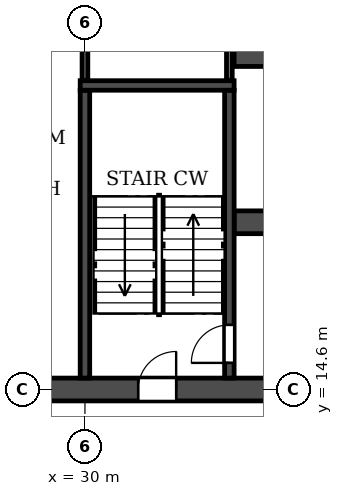
"""IFC4 building model, lengths in metres.
Left out: names, types, materials, properties, quantities, classifications, styles, units other than length and angle.
Written with IfcOpenShell. Run it as: python <this file> out.ifc"""

import sys

from ifc_helpers import new_model, si_unit, direction, frame, frame_2d, origin, place, context, subcontext, project, spatial, rectangle, extrude, element, fill, save


model = new_model("IFC4")
c1 = context("Model", 3, precision=1e-05, world=origin(), true_north=direction((0.0, 1.0)))
c2 = subcontext(c1, "Body", "Model", "MODEL_VIEW")
j1 = project(units=[si_unit("LENGTHUNIT", "METRE"), si_unit("PLANEANGLEUNIT", "RADIAN")], contexts=[c1])
p1 = place(None, origin())
s1 = spatial("IfcSite", under=j1, at=p1, CompositionType="ELEMENT")
p2 = place(p1, origin())
s2 = spatial("IfcBuilding", under=s1, at=p2, CompositionType="ELEMENT")
p3 = place(p2, frame((0.0, 0.0, 26.7)))
s3 = spatial("IfcBuildingStorey", under=s2, at=p3, CompositionType="ELEMENT", Elevation=26.7)
p4 = place(p3, frame((2.6, 14.6, 0.0), z_axis=(0.0, 0.0, 1.0), x_axis=(1.0, 0.0, 0.0)))
e1 = element("IfcWall", 1, at=p4, inside=s3, PredefinedType="SOLIDWALL", context=c2, shape_type="SweptSolid", body=[
    extrude(rectangle(XDim=96.8, YDim=0.6, at=frame_2d((48.4, 0.0))), origin(), (0.0, 0.0, 1.0), 3.05),
])
p5 = place(p4, frame((7.2, 0.0, 0.0)))
e2 = element("IfcOpeningElement", 2, at=p5, cuts=e1, PredefinedType="OPENING", context=c2, shape_type="SweptSolid", body=[
    extrude(rectangle(XDim=1.0, YDim=2.1, at=frame_2d((0.5, 1.05))), frame((0.0, 0.31, 0.0), z_axis=(0.0, -1.0, 0.0), x_axis=(1.0, 0.0, 0.0)), (0.0, 0.0, 1.0), 0.62),
])
p6 = place(p4, frame((16.3, 0.0, 0.0)))
e3 = element("IfcOpeningElement", 3, at=p6, cuts=e1, PredefinedType="OPENING", context=c2, shape_type="SweptSolid", body=[
    extrude(rectangle(XDim=1.0, YDim=2.1, at=frame_2d((0.5, 1.05))), frame((0.0, 0.31, 0.0), z_axis=(0.0, -1.0, 0.0), x_axis=(1.0, 0.0, 0.0)), (0.0, 0.0, 1.0), 0.62),
])
p7 = place(p4, frame((24.2, 0.0, 0.0)))
e4 = element("IfcOpeningElement", 4, at=p7, cuts=e1, PredefinedType="OPENING", context=c2, shape_type="SweptSolid", body=[
    extrude(rectangle(XDim=1.0, YDim=2.1, at=frame_2d((0.5, 1.05))), frame((0.0, 0.31, 0.0), z_axis=(0.0, -1.0, 0.0), x_axis=(1.0, 0.0, 0.0)), (0.0, 0.0, 1.0), 0.62),
])
p8 = place(p4, frame((28.8, 0.0, 0.0)))
e5 = element("IfcOpeningElement", 5, at=p8, cuts=e1, PredefinedType="OPENING", context=c2, shape_type="SweptSolid", body=[
    extrude(rectangle(XDim=1.0, YDim=2.1, at=frame_2d((0.5, 1.05))), frame((0.0, 0.31, 0.0), z_axis=(0.0, -1.0, 0.0), x_axis=(1.0, 0.0, 0.0)), (0.0, 0.0, 1.0), 0.62),
])
p9 = place(p4, frame((40.1, 0.0, 0.0)))
e6 = element("IfcOpeningElement", 6, at=p9, cuts=e1, PredefinedType="OPENING", context=c2, shape_type="SweptSolid", body=[
    extrude(rectangle(XDim=1.0, YDim=2.1, at=frame_2d((0.5, 1.05))), frame((0.0, 0.31, 0.0), z_axis=(0.0, -1.0, 0.0), x_axis=(1.0, 0.0, 0.0)), (0.0, 0.0, 1.0), 0.62),
])
p10 = place(p4, frame((44.0, 0.0, 0.0)))
e7 = element("IfcOpeningElement", 7, at=p10, cuts=e1, PredefinedType="OPENING", context=c2, shape_type="SweptSolid", body=[
    extrude(rectangle(XDim=1.0, YDim=2.1, at=frame_2d((0.5, 1.05))), frame((0.0, 0.31, 0.0), z_axis=(0.0, -1.0, 0.0), x_axis=(1.0, 0.0, 0.0)), (0.0, 0.0, 1.0), 0.62),
])
p11 = place(p4, frame((47.9, 0.0, 0.0)))
e8 = element("IfcOpeningElement", 8, at=p11, cuts=e1, PredefinedType="OPENING", context=c2, shape_type="SweptSolid", body=[
    extrude(rectangle(XDim=1.0, YDim=2.1, at=frame_2d((0.5, 1.05))), frame((0.0, 0.31, 0.0), z_axis=(0.0, -1.0, 0.0), x_axis=(1.0, 0.0, 0.0)), (0.0, 0.0, 1.0), 0.62),
])
p12 = place(p4, frame((53.1, 0.0, 0.0)))
e9 = element("IfcOpeningElement", 9, at=p12, cuts=e1, PredefinedType="OPENING", context=c2, shape_type="SweptSolid", body=[
    extrude(rectangle(XDim=1.0, YDim=2.1, at=frame_2d((0.5, 1.05))), frame((0.0, 0.31, 0.0), z_axis=(0.0, -1.0, 0.0), x_axis=(1.0, 0.0, 0.0)), (0.0, 0.0, 1.0), 0.62),
])
p13 = place(p4, frame((67.0, 0.0, 0.0)))
e10 = element("IfcOpeningElement", 10, at=p13, cuts=e1, PredefinedType="OPENING", context=c2, shape_type="SweptSolid", body=[
    extrude(rectangle(XDim=1.0, YDim=2.1, at=frame_2d((0.5, 1.05))), frame((0.0, 0.31, 0.0), z_axis=(0.0, -1.0, 0.0), x_axis=(1.0, 0.0, 0.0)), (0.0, 0.0, 1.0), 0.62),
])
p14 = place(p4, frame((71.6, 0.0, 0.0)))
e11 = element("IfcOpeningElement", 11, at=p14, cuts=e1, PredefinedType="OPENING", context=c2, shape_type="SweptSolid", body=[
    extrude(rectangle(XDim=1.0, YDim=2.1, at=frame_2d((0.5, 1.05))), frame((0.0, 0.31, 0.0), z_axis=(0.0, -1.0, 0.0), x_axis=(1.0, 0.0, 0.0)), (0.0, 0.0, 1.0), 0.62),
])
p15 = place(p4, frame((79.5, 0.0, 0.0)))
e12 = element("IfcOpeningElement", 12, at=p15, cuts=e1, PredefinedType="OPENING", context=c2, shape_type="SweptSolid", body=[
    extrude(rectangle(XDim=1.0, YDim=2.1, at=frame_2d((0.5, 1.05))), frame((0.0, 0.31, 0.0), z_axis=(0.0, -1.0, 0.0), x_axis=(1.0, 0.0, 0.0)), (0.0, 0.0, 1.0), 0.62),
])
p16 = place(p4, frame((83.15, 0.0, 0.0)))
e13 = element("IfcOpeningElement", 13, at=p16, cuts=e1, PredefinedType="OPENING", context=c2, shape_type="SweptSolid", body=[
    extrude(rectangle(XDim=1.0, YDim=2.1, at=frame_2d((0.5, 1.05))), frame((0.0, 0.31, 0.0), z_axis=(0.0, -1.0, 0.0), x_axis=(1.0, 0.0, 0.0)), (0.0, 0.0, 1.0), 0.62),
])
p17 = place(p4, frame((90.85, 0.0, 0.0)))
e14 = element("IfcOpeningElement", 14, at=p17, cuts=e1, PredefinedType="OPENING", context=c2, shape_type="SweptSolid", body=[
    extrude(rectangle(XDim=1.0, YDim=2.1, at=frame_2d((0.5, 1.05))), frame((0.0, 0.31, 0.0), z_axis=(0.0, -1.0, 0.0), x_axis=(1.0, 0.0, 0.0)), (0.0, 0.0, 1.0), 0.62),
])
p18 = place(p3, frame((33.925, 19.0, 0.0), z_axis=(0.0, 0.0, 1.0), x_axis=(1.0, 0.0, 0.0)))
e15 = element("IfcWall", 15, at=p18, inside=s3, PredefinedType="SOLIDWALL", context=c2, shape_type="SweptSolid", body=[
    extrude(rectangle(XDim=34.15, YDim=0.6, at=frame_2d((17.075, 0.0))), origin(), (0.0, 0.0, 1.0), 3.05),
])
p19 = place(p18, frame((16.175, 0.0, 0.0)))
e16 = element("IfcOpeningElement", 16, at=p19, cuts=e15, PredefinedType="OPENING", context=c2, shape_type="SweptSolid", body=[
    extrude(rectangle(XDim=1.8, YDim=2.1, at=frame_2d((0.9, 1.05))), frame((0.0, 0.31, 0.0), z_axis=(0.0, -1.0, 0.0), x_axis=(1.0, 0.0, 0.0)), (0.0, 0.0, 1.0), 0.62),
])
p20 = place(p18, frame((1.525, 0.0, 0.0)))
e17 = element("IfcOpeningElement", 17, at=p20, cuts=e15, PredefinedType="OPENING", context=c2, shape_type="SweptSolid", body=[
    extrude(rectangle(XDim=1.8, YDim=2.1, at=frame_2d((0.9, 1.05))), frame((0.0, 0.31, 0.0), z_axis=(0.0, -1.0, 0.0), x_axis=(1.0, 0.0, 0.0)), (0.0, 0.0, 1.0), 0.62),
])
p21 = place(p18, frame((8.725, 0.0, 0.0)))
e18 = element("IfcOpeningElement", 18, at=p21, cuts=e15, PredefinedType="OPENING", context=c2, shape_type="SweptSolid", body=[
    extrude(rectangle(XDim=1.1, YDim=2.1, at=frame_2d((0.55, 1.05))), frame((0.0, 0.31, 0.0), z_axis=(0.0, -1.0, 0.0), x_axis=(1.0, 0.0, 0.0)), (0.0, 0.0, 1.0), 0.62),
])
p22 = place(p18, frame((11.325, 0.0, 0.0)))
e19 = element("IfcOpeningElement", 19, at=p22, cuts=e15, PredefinedType="OPENING", context=c2, shape_type="SweptSolid", body=[
    extrude(rectangle(XDim=1.1, YDim=2.1, at=frame_2d((0.55, 1.05))), frame((0.0, 0.31, 0.0), z_axis=(0.0, -1.0, 0.0), x_axis=(1.0, 0.0, 0.0)), (0.0, 0.0, 1.0), 0.62),
])
p23 = place(p18, frame((13.925, 0.0, 0.0)))
e20 = element("IfcOpeningElement", 20, at=p23, cuts=e15, PredefinedType="OPENING", context=c2, shape_type="SweptSolid", body=[
    extrude(rectangle(XDim=1.1, YDim=2.1, at=frame_2d((0.55, 1.05))), frame((0.0, 0.31, 0.0), z_axis=(0.0, -1.0, 0.0), x_axis=(1.0, 0.0, 0.0)), (0.0, 0.0, 1.0), 0.62),
])
p24 = place(p18, frame((19.125, 0.0, 0.0)))
e21 = element("IfcOpeningElement", 21, at=p24, cuts=e15, PredefinedType="OPENING", context=c2, shape_type="SweptSolid", body=[
    extrude(rectangle(XDim=1.1, YDim=2.1, at=frame_2d((0.55, 1.05))), frame((0.0, 0.31, 0.0), z_axis=(0.0, -1.0, 0.0), x_axis=(1.0, 0.0, 0.0)), (0.0, 0.0, 1.0), 0.62),
])
p25 = place(p18, frame((21.725, 0.0, 0.0)))
e22 = element("IfcOpeningElement", 22, at=p25, cuts=e15, PredefinedType="OPENING", context=c2, shape_type="SweptSolid", body=[
    extrude(rectangle(XDim=1.1, YDim=2.1, at=frame_2d((0.55, 1.05))), frame((0.0, 0.31, 0.0), z_axis=(0.0, -1.0, 0.0), x_axis=(1.0, 0.0, 0.0)), (0.0, 0.0, 1.0), 0.62),
])
p26 = place(p18, frame((24.325, 0.0, 0.0)))
e23 = element("IfcOpeningElement", 23, at=p26, cuts=e15, PredefinedType="OPENING", context=c2, shape_type="SweptSolid", body=[
    extrude(rectangle(XDim=1.1, YDim=2.1, at=frame_2d((0.55, 1.05))), frame((0.0, 0.31, 0.0), z_axis=(0.0, -1.0, 0.0), x_axis=(1.0, 0.0, 0.0)), (0.0, 0.0, 1.0), 0.62),
])
p27 = place(p18, frame((30.825, 0.0, 0.0)))
e24 = element("IfcOpeningElement", 24, at=p27, cuts=e15, PredefinedType="OPENING", context=c2, shape_type="SweptSolid", body=[
    extrude(rectangle(XDim=1.8, YDim=2.1, at=frame_2d((0.9, 1.05))), frame((0.0, 0.31, 0.0), z_axis=(0.0, -1.0, 0.0), x_axis=(1.0, 0.0, 0.0)), (0.0, 0.0, 1.0), 0.62),
])
p28 = place(p3, frame((33.925, 23.4, 0.0), z_axis=(0.0, 0.0, 1.0), x_axis=(1.0, 0.0, 0.0)))
e25 = element("IfcWall", 25, at=p28, inside=s3, PredefinedType="SOLIDWALL", context=c2, shape_type="SweptSolid", body=[
    extrude(rectangle(XDim=34.15, YDim=0.6, at=frame_2d((17.075, 0.0))), origin(), (0.0, 0.0, 1.0), 3.05),
])
p29 = place(p28, frame((16.175, 0.0, 0.0)))
e26 = element("IfcOpeningElement", 26, at=p29, cuts=e25, PredefinedType="OPENING", context=c2, shape_type="SweptSolid", body=[
    extrude(rectangle(XDim=1.8, YDim=2.1, at=frame_2d((0.9, 1.05))), frame((0.0, 0.31, 0.0), z_axis=(0.0, -1.0, 0.0), x_axis=(1.0, 0.0, 0.0)), (0.0, 0.0, 1.0), 0.62),
])
p30 = place(p28, frame((11.025, 0.0, 0.0)))
e27 = element("IfcOpeningElement", 27, at=p30, cuts=e25, PredefinedType="OPENING", context=c2, shape_type="SweptSolid", body=[
    extrude(rectangle(XDim=1.1, YDim=2.1, at=frame_2d((0.55, 1.05))), frame((0.0, 0.31, 0.0), z_axis=(0.0, -1.0, 0.0), x_axis=(1.0, 0.0, 0.0)), (0.0, 0.0, 1.0), 0.62),
])
p31 = place(p3, frame((30.0, 14.9, 0.0), z_axis=(0.0, 0.0, 1.0), x_axis=(0.0, 1.0, 0.0)))
e28 = element("IfcWall", 28, at=p31, inside=s3, PredefinedType="SOLIDWALL", context=c2, shape_type="SweptSolid", body=[
    extrude(rectangle(XDim=7.575, YDim=0.25, at=frame_2d((3.788, 0.0))), origin(), (0.0, 0.0, 1.0), 3.05),
])
p32 = place(p3, frame((33.8, 14.9, 0.0), z_axis=(0.0, 0.0, 1.0), x_axis=(0.0, 1.0, 0.0)))
e29 = element("IfcWall", 29, at=p32, inside=s3, PredefinedType="SOLIDWALL", context=c2, shape_type="SweptSolid", body=[
    extrude(rectangle(XDim=7.575, YDim=0.25, at=frame_2d((3.788, 0.0))), origin(), (0.0, 0.0, 1.0), 3.05),
])
p33 = place(p32, frame((0.4, 0.0, 0.0)))
e30 = element("IfcOpeningElement", 30, at=p33, cuts=e29, PredefinedType="OPENING", context=c2, shape_type="SweptSolid", body=[
    extrude(rectangle(XDim=1.0, YDim=2.1, at=frame_2d((0.5, 1.05))), frame((0.0, 0.135, 0.0), z_axis=(0.0, -1.0, 0.0), x_axis=(1.0, 0.0, 0.0)), (0.0, 0.0, 1.0), 0.27),
])
p34 = place(p3, frame((29.875, 22.6, 0.0), z_axis=(0.0, 0.0, 1.0), x_axis=(1.0, 0.0, 0.0)))
e31 = element("IfcWall", 31, at=p34, inside=s3, PredefinedType="SOLIDWALL", context=c2, shape_type="SweptSolid", body=[
    extrude(rectangle(XDim=4.05, YDim=0.25, at=frame_2d((2.025, 0.0))), origin(), (0.0, 0.0, 1.0), 3.05),
])
for number, where, z_axis, x_axis in (
    (32, (30.0, 22.735, 0.0), (0.0, 0.0, 1.0), (0.0, 1.0, 0.0)),
    (33, (33.8, 22.735, 0.0), (0.0, 0.0, 1.0), (0.0, 1.0, 0.0)),
):
    element("IfcWall", number, at=place(p3, frame(where, z_axis=z_axis, x_axis=x_axis)), inside=s3, PredefinedType="PARTITIONING", context=c2, shape_type="SweptSolid", body=[
        extrude(rectangle(XDim=4.755, YDim=0.15, at=frame_2d((2.377, 0.0))), origin(), (0.0, 0.0, 1.0), 3.05),
    ])
p35 = place(p8, origin())
e34 = element("IfcDoor", 34, at=p35, inside=s3, OperationType="SINGLE_SWING_RIGHT", PredefinedType="DOOR", context=c2, shape_type="SweptSolid", body=[
    extrude(rectangle(XDim=1.0, YDim=2.1, at=frame_2d((0.5, 1.05))), frame((0.0, 0.025, 0.0), z_axis=(0.0, -1.0, 0.0), x_axis=(1.0, 0.0, 0.0)), (0.0, 0.0, 1.0), 0.05),
])
fill(e5, e34)
p36 = place(p33, origin())
e35 = element("IfcDoor", 35, at=p36, inside=s3, OperationType="SINGLE_SWING_LEFT", PredefinedType="DOOR", context=c2, shape_type="SweptSolid", body=[
    extrude(rectangle(XDim=1.0, YDim=2.1, at=frame_2d((0.5, 1.05))), frame((0.0, 0.025, 0.0), z_axis=(0.0, -1.0, 0.0), x_axis=(1.0, 0.0, 0.0)), (0.0, 0.0, 1.0), 0.05),
])
fill(e30, e35)
save(model, sys.argv[1])
